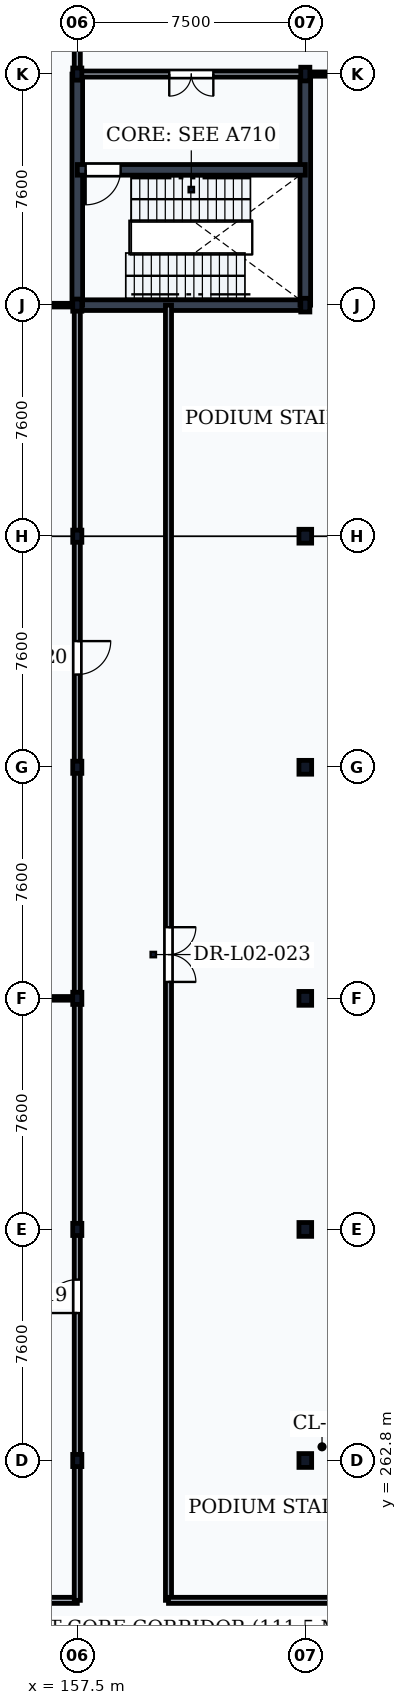
"""IFC4 building model, lengths in metres.
Left out: names, types, materials, properties, quantities, classifications, styles, units other than length and angle.
Written with IfcOpenShell. Run it as: python <this file> out.ifc"""

import sys

from ifc_helpers import new_model, si_unit, direction, frame, frame_2d, origin, origin_2d, place, context, subcontext, project, spatial, rectangle, i_section, extrude, element, fill, save


model = new_model("IFC4")
c1 = context("Model", 3, precision=1e-05, world=origin(), true_north=direction((0.0, 1.0)))
c2 = subcontext(c1, "Body", "Model", "MODEL_VIEW")
j1 = project(units=[si_unit("LENGTHUNIT", "METRE"), si_unit("PLANEANGLEUNIT", "RADIAN")], contexts=[c1])
p1 = place(None, origin())
s1 = spatial("IfcSite", under=j1, at=p1, CompositionType="ELEMENT")
p2 = place(p1, origin())
s2 = spatial("IfcBuilding", under=s1, at=p2, CompositionType="ELEMENT")
p3 = place(p2, frame((0.0, 0.0, 5.4)))
s3 = spatial("IfcBuildingStorey", under=s2, at=p3, CompositionType="ELEMENT", Elevation=5.4)
for number, where, z_axis, x_axis in (
    (1, (157.5, 262.8, 0.0), (0.0, 0.0, 1.0), (1.0, 0.0, 0.0)),
    (2, (157.5, 270.4, 0.0), (0.0, 0.0, 1.0), (1.0, 0.0, 0.0)),
    (3, (157.5, 278.0, 0.0), (0.0, 0.0, 1.0), (1.0, 0.0, 0.0)),
    (4, (157.5, 285.6, 0.0), (0.0, 0.0, 1.0), (1.0, 0.0, 0.0)),
    (5, (157.5, 293.2, 0.0), (0.0, 0.0, 1.0), (1.0, 0.0, 0.0)),
    (6, (157.5, 300.8, 0.0), (0.0, 0.0, 1.0), (1.0, 0.0, 0.0)),
    (7, (157.5, 308.4, 0.0), (0.0, 0.0, 1.0), (1.0, 0.0, 0.0)),
):
    element("IfcColumn", number, at=place(p3, frame(where, z_axis=z_axis, x_axis=x_axis)), inside=s3, PredefinedType="COLUMN", context=c2, shape_type="SweptSolid", body=[
        extrude(i_section(OverallWidth=0.3, OverallDepth=0.4, WebThickness=0.013, FlangeThickness=0.024, FilletRadius=0.027, at=origin_2d()), origin(), (0.0, 0.0, 1.0), 5.1),
    ])
for number, where, z_axis, x_axis in (
    (8, (165.0, 262.8, 0.0), (0.0, 0.0, 1.0), (1.0, 0.0, 0.0)),
    (9, (165.0, 270.4, 0.0), (0.0, 0.0, 1.0), (1.0, 0.0, 0.0)),
    (10, (165.0, 278.0, 0.0), (0.0, 0.0, 1.0), (1.0, 0.0, 0.0)),
    (11, (165.0, 285.6, 0.0), (0.0, 0.0, 1.0), (1.0, 0.0, 0.0)),
    (12, (165.0, 293.2, 0.0), (0.0, 0.0, 1.0), (1.0, 0.0, 0.0)),
):
    element("IfcColumn", number, at=place(p3, frame(where, z_axis=z_axis, x_axis=x_axis)), inside=s3, PredefinedType="COLUMN", context=c2, shape_type="SweptSolid", body=[
        extrude(i_section(OverallWidth=0.418, OverallDepth=0.455, WebThickness=0.042, FlangeThickness=0.068, FilletRadius=0.015, at=origin_2d()), origin(), (0.0, 0.0, 1.0), 5.1),
    ])
for number, where, z_axis, x_axis in (
    (13, (165.0, 300.8, 0.0), (0.0, 0.0, 1.0), (1.0, 0.0, 0.0)),
    (14, (165.0, 308.4, 0.0), (0.0, 0.0, 1.0), (1.0, 0.0, 0.0)),
):
    element("IfcColumn", number, at=place(p3, frame(where, z_axis=z_axis, x_axis=x_axis)), inside=s3, PredefinedType="COLUMN", context=c2, shape_type="SweptSolid", body=[
        extrude(i_section(OverallWidth=0.3, OverallDepth=0.45, WebThickness=0.014, FlangeThickness=0.026, FilletRadius=0.027, at=origin_2d()), origin(), (0.0, 0.0, 1.0), 5.1),
    ])
p4 = place(p3, frame((157.5, 300.8, 0.0), z_axis=(0.0, 0.0, 1.0), x_axis=(1.0, 0.0, 0.0)))
e15 = element("IfcWall", 15, at=p4, inside=s3, PredefinedType="SHEAR", context=c2, shape_type="SweptSolid", body=[
    extrude(rectangle(XDim=7.5, YDim=0.35, at=frame_2d((3.75, 0.0))), origin(), (0.0, 0.0, 1.0), 4.86),
])
for number, where, z_axis, x_axis in (
    (16, (157.5, 300.8, 0.0), (0.0, 0.0, 1.0), (0.0, 1.0, 0.0)),
    (17, (165.0, 300.8, 0.0), (0.0, 0.0, 1.0), (0.0, 1.0, 0.0)),
):
    element("IfcWall", number, at=place(p3, frame(where, z_axis=z_axis, x_axis=x_axis)), inside=s3, PredefinedType="SHEAR", context=c2, shape_type="SweptSolid", body=[
        extrude(rectangle(XDim=7.6, YDim=0.35, at=frame_2d((3.8, 0.0))), origin(), (0.0, 0.0, 1.0), 4.86),
    ])
p5 = place(p3, frame((157.5, 305.25, 0.0), z_axis=(0.0, 0.0, 1.0), x_axis=(1.0, 0.0, 0.0)))
e18 = element("IfcWall", 18, at=p5, inside=s3, PredefinedType="SHEAR", context=c2, shape_type="SweptSolid", body=[
    extrude(rectangle(XDim=7.5, YDim=0.35, at=frame_2d((3.75, 0.0))), origin(), (0.0, 0.0, 1.0), 4.86),
])
p6 = place(p5, frame((0.275, 0.0, 0.0)))
e19 = element("IfcOpeningElement", 19, at=p6, cuts=e18, PredefinedType="OPENING", context=c2, shape_type="SweptSolid", body=[
    extrude(rectangle(XDim=1.15, YDim=2.15, at=frame_2d((0.575, 1.075))), frame((0.0, 0.19, 0.0), z_axis=(0.0, -1.0, 0.0), x_axis=(1.0, 0.0, 0.0)), (0.0, 0.0, 1.0), 0.38),
])
p7 = place(p3, frame((157.5, 308.4, 0.0), z_axis=(0.0, 0.0, 1.0), x_axis=(1.0, 0.0, 0.0)))
e20 = element("IfcWall", 20, at=p7, inside=s3, PredefinedType="PARTITIONING", context=c2, shape_type="SweptSolid", body=[
    extrude(rectangle(XDim=7.5, YDim=0.2, at=frame_2d((3.75, 0.0))), origin(), (0.0, 0.0, 1.0), 4.498),
])
p8 = place(p7, frame((3.025, 0.0, 0.0)))
e21 = element("IfcOpeningElement", 21, at=p8, cuts=e20, PredefinedType="OPENING", context=c2, shape_type="SweptSolid", body=[
    extrude(rectangle(XDim=1.45, YDim=2.2, at=frame_2d((0.725, 1.1))), frame((0.0, 0.115, 0.0), z_axis=(0.0, -1.0, 0.0), x_axis=(1.0, 0.0, 0.0)), (0.0, 0.0, 1.0), 0.23),
])
p9 = place(p3, frame((135.0, 258.2, 0.0), z_axis=(0.0, 0.0, 1.0), x_axis=(1.0, 0.0, 0.0)))
e22 = element("IfcWall", 22, at=p9, inside=s3, PredefinedType="PARTITIONING", context=c2, shape_type="SweptSolid", body=[
    extrude(rectangle(XDim=22.5, YDim=0.2, at=frame_2d((11.25, 0.0))), origin(), (0.0, 0.0, 1.0), 4.85),
])
p10 = place(p9, frame((10.25, 0.0, 0.0)))
e23 = element("IfcOpeningElement", 23, at=p10, cuts=e22, PredefinedType="OPENING", context=c2, shape_type="SweptSolid", body=[
    extrude(rectangle(XDim=1.5, YDim=2.25, at=frame_2d((0.75, 1.125))), frame((0.0, 0.115, 0.0), z_axis=(0.0, -1.0, 0.0), x_axis=(1.0, 0.0, 0.0)), (0.0, 0.0, 1.0), 0.23),
])
p11 = place(p3, frame((157.5, 258.2, 0.0), z_axis=(0.0, 0.0, 1.0), x_axis=(0.0, 1.0, 0.0)))
e24 = element("IfcWall", 24, at=p11, inside=s3, PredefinedType="PARTITIONING", context=c2, shape_type="SweptSolid", body=[
    extrude(rectangle(XDim=42.6, YDim=0.2, at=frame_2d((21.3, 0.0))), origin(), (0.0, 0.0, 1.0), 4.498),
])
p12 = place(p11, frame((9.45, 0.0, 0.0)))
e25 = element("IfcOpeningElement", 25, at=p12, cuts=e24, PredefinedType="OPENING", context=c2, shape_type="SweptSolid", body=[
    extrude(rectangle(XDim=1.1, YDim=2.1, at=frame_2d((0.55, 1.05))), frame((0.0, 0.115, 0.0), z_axis=(0.0, -1.0, 0.0), x_axis=(1.0, 0.0, 0.0)), (0.0, 0.0, 1.0), 0.23),
])
p13 = place(p11, frame((30.45, 0.0, 0.0)))
e26 = element("IfcOpeningElement", 26, at=p13, cuts=e24, PredefinedType="OPENING", context=c2, shape_type="SweptSolid", body=[
    extrude(rectangle(XDim=1.1, YDim=2.1, at=frame_2d((0.55, 1.05))), frame((0.0, 0.115, 0.0), z_axis=(0.0, -1.0, 0.0), x_axis=(1.0, 0.0, 0.0)), (0.0, 0.0, 1.0), 0.23),
])
p14 = place(p3, frame((157.5, 308.4, 0.0), z_axis=(0.0, 0.0, 1.0), x_axis=(0.0, 1.0, 0.0)))
e27 = element("IfcWall", 27, at=p14, inside=s3, PredefinedType="PARTITIONING", context=c2, shape_type="SweptSolid", body=[
    extrude(rectangle(XDim=29.6, YDim=0.2, at=frame_2d((14.8, 0.0))), origin(), (0.0, 0.0, 1.0), 4.498),
])
p15 = place(p14, frame((3.45, 0.0, 0.0)))
e28 = element("IfcOpeningElement", 28, at=p15, cuts=e27, PredefinedType="OPENING", context=c2, shape_type="SweptSolid", body=[
    extrude(rectangle(XDim=1.1, YDim=2.1, at=frame_2d((0.55, 1.05))), frame((0.0, 0.115, 0.0), z_axis=(0.0, -1.0, 0.0), x_axis=(1.0, 0.0, 0.0)), (0.0, 0.0, 1.0), 0.23),
])
p16 = place(p14, frame((17.25, 0.0, 0.0)))
e29 = element("IfcOpeningElement", 29, at=p16, cuts=e27, PredefinedType="OPENING", context=c2, shape_type="SweptSolid", body=[
    extrude(rectangle(XDim=1.5, YDim=2.25, at=frame_2d((0.75, 1.125))), frame((0.0, 0.115, 0.0), z_axis=(0.0, -1.0, 0.0), x_axis=(1.0, 0.0, 0.0)), (0.0, 0.0, 1.0), 0.23),
])
p17 = place(p3, frame((160.5, 258.2, 0.0), z_axis=(0.0, 0.0, 1.0), x_axis=(0.0, 1.0, 0.0)))
e30 = element("IfcWall", 30, at=p17, inside=s3, PredefinedType="PARTITIONING", context=c2, shape_type="SweptSolid", body=[
    extrude(rectangle(XDim=42.6, YDim=0.2, at=frame_2d((21.3, 0.0))), origin(), (0.0, 0.0, 1.0), 4.86),
])
p18 = place(p17, frame((20.34, 0.0, 0.0)))
e31 = element("IfcOpeningElement", 31, at=p18, cuts=e30, PredefinedType="OPENING", context=c2, shape_type="SweptSolid", body=[
    extrude(rectangle(XDim=1.8, YDim=2.4, at=frame_2d((0.9, 1.2))), frame((0.0, 0.115, 0.0), z_axis=(0.0, -1.0, 0.0), x_axis=(1.0, 0.0, 0.0)), (0.0, 0.0, 1.0), 0.23),
])
p19 = place(p3, frame((135.0, 278.0, 0.0), z_axis=(0.0, 0.0, 1.0), x_axis=(1.0, 0.0, 0.0)))
e32 = element("IfcWall", 32, at=p19, inside=s3, PredefinedType="PARTITIONING", context=c2, shape_type="SweptSolid", body=[
    extrude(rectangle(XDim=22.5, YDim=0.12, at=frame_2d((11.25, 0.0))), origin(), (0.0, 0.0, 1.0), 4.488),
])
p20 = place(p19, frame((8.3, 0.0, 0.0)))
e33 = element("IfcOpeningElement", 33, at=p20, cuts=e32, PredefinedType="OPENING", context=c2, shape_type="SweptSolid", body=[
    extrude(rectangle(XDim=1.0, YDim=2.1, at=frame_2d((0.5, 1.05))), frame((0.0, 0.075, 0.0), z_axis=(0.0, -1.0, 0.0), x_axis=(1.0, 0.0, 0.0)), (0.0, 0.0, 1.0), 0.15),
])
p21 = place(p3, frame((135.0, 300.8, 0.0), z_axis=(0.0, 0.0, 1.0), x_axis=(1.0, 0.0, 0.0)))
e34 = element("IfcWall", 34, at=p21, inside=s3, PredefinedType="PARTITIONING", context=c2, shape_type="SweptSolid", body=[
    extrude(rectangle(XDim=22.5, YDim=0.12, at=frame_2d((11.25, 0.0))), origin(), (0.0, 0.0, 1.0), 4.488),
])
p22 = place(p21, frame((8.3, 0.0, 0.0)))
e35 = element("IfcOpeningElement", 35, at=p22, cuts=e34, PredefinedType="OPENING", context=c2, shape_type="SweptSolid", body=[
    extrude(rectangle(XDim=1.0, YDim=2.1, at=frame_2d((0.5, 1.05))), frame((0.0, 0.075, 0.0), z_axis=(0.0, -1.0, 0.0), x_axis=(1.0, 0.0, 0.0)), (0.0, 0.0, 1.0), 0.15),
])
p23 = place(p3, frame((160.5, 258.2, 0.0), z_axis=(0.0, 0.0, 1.0), x_axis=(1.0, 0.0, 0.0)))
e36 = element("IfcWall", 36, at=p23, inside=s3, PredefinedType="PARTITIONING", context=c2, shape_type="SweptSolid", body=[
    extrude(rectangle(XDim=94.5, YDim=0.2, at=frame_2d((47.25, 0.0))), origin(), (0.0, 0.0, 1.0), 4.86),
])
p24 = place(p23, frame((24.1, 0.0, 0.0)))
e37 = element("IfcOpeningElement", 37, at=p24, cuts=e36, PredefinedType="OPENING", context=c2, shape_type="SweptSolid", body=[
    extrude(rectangle(XDim=1.8, YDim=2.4, at=frame_2d((0.9, 1.2))), frame((0.0, 0.115, 0.0), z_axis=(0.0, -1.0, 0.0), x_axis=(1.0, 0.0, 0.0)), (0.0, 0.0, 1.0), 0.23),
])
p25 = place(p23, frame((77.1, 0.0, 0.0)))
e38 = element("IfcOpeningElement", 38, at=p25, cuts=e36, PredefinedType="OPENING", context=c2, shape_type="SweptSolid", body=[
    extrude(rectangle(XDim=1.8, YDim=2.4, at=frame_2d((0.9, 1.2))), frame((0.0, 0.115, 0.0), z_axis=(0.0, -1.0, 0.0), x_axis=(1.0, 0.0, 0.0)), (0.0, 0.0, 1.0), 0.23),
])
p26 = place(p3, frame((165.0, 308.4, 0.0), z_axis=(0.0, 0.0, 1.0), x_axis=(1.0, 0.0, 0.0)))
e39 = element("IfcWall", 39, at=p26, inside=s3, PredefinedType="PARTITIONING", context=c2, shape_type="SweptSolid", body=[
    extrude(rectangle(XDim=32.0, YDim=0.14, at=frame_2d((16.0, 0.0))), origin(), (0.0, 0.0, 1.0), 4.408),
])
p27 = place(p26, frame((16.6, 0.0, 0.0)))
e40 = element("IfcOpeningElement", 40, at=p27, cuts=e39, PredefinedType="OPENING", context=c2, shape_type="SweptSolid", body=[
    extrude(rectangle(XDim=1.8, YDim=2.4, at=frame_2d((0.9, 1.2))), frame((0.0, 0.085, 0.0), z_axis=(0.0, -1.0, 0.0), x_axis=(1.0, 0.0, 0.0)), (0.0, 0.0, 1.0), 0.17),
])
p28 = place(p6, frame((1.15, 0.0, 0.0), z_axis=(0.0, 0.0, 1.0), x_axis=(-1.0, 0.0, 0.0)))
e41 = element("IfcDoor", 41, at=p28, inside=s3, OperationType="SINGLE_SWING_RIGHT", PredefinedType="DOOR", context=c2, shape_type="SweptSolid", body=[
    extrude(rectangle(XDim=1.15, YDim=2.15, at=frame_2d((0.575, 1.075))), frame((0.0, 0.025, 0.0), z_axis=(0.0, -1.0, 0.0), x_axis=(1.0, 0.0, 0.0)), (0.0, 0.0, 1.0), 0.05),
])
fill(e19, e41)
p29 = place(p8, frame((1.45, 0.0, 0.0), z_axis=(0.0, 0.0, 1.0), x_axis=(-1.0, 0.0, 0.0)))
e42 = element("IfcDoor", 42, at=p29, inside=s3, OperationType="DOUBLE_DOOR_SINGLE_SWING", PredefinedType="DOOR", context=c2, shape_type="SweptSolid", body=[
    extrude(rectangle(XDim=1.45, YDim=2.2, at=frame_2d((0.725, 1.1))), frame((0.0, 0.025, 0.0), z_axis=(0.0, -1.0, 0.0), x_axis=(1.0, 0.0, 0.0)), (0.0, 0.0, 1.0), 0.05),
])
fill(e21, e42)
p30 = place(p12, origin())
e43 = element("IfcDoor", 43, at=p30, inside=s3, OperationType="SINGLE_SWING_LEFT", PredefinedType="DOOR", context=c2, shape_type="SweptSolid", body=[
    extrude(rectangle(XDim=1.1, YDim=2.1, at=frame_2d((0.55, 1.05))), frame((0.0, 0.025, 0.0), z_axis=(0.0, -1.0, 0.0), x_axis=(1.0, 0.0, 0.0)), (0.0, 0.0, 1.0), 0.05),
])
fill(e25, e43)
p31 = place(p13, origin())
e44 = element("IfcDoor", 44, at=p31, inside=s3, OperationType="SINGLE_SWING_RIGHT", PredefinedType="DOOR", context=c2, shape_type="SweptSolid", body=[
    extrude(rectangle(XDim=1.1, YDim=2.1, at=frame_2d((0.55, 1.05))), frame((0.0, 0.025, 0.0), z_axis=(0.0, -1.0, 0.0), x_axis=(1.0, 0.0, 0.0)), (0.0, 0.0, 1.0), 0.05),
])
fill(e26, e44)
p32 = place(p18, frame((1.8, 0.0, 0.0), z_axis=(0.0, 0.0, 1.0), x_axis=(-1.0, 0.0, 0.0)))
e45 = element("IfcDoor", 45, at=p32, inside=s3, OperationType="DOUBLE_DOOR_SINGLE_SWING", PredefinedType="DOOR", context=c2, shape_type="SweptSolid", body=[
    extrude(rectangle(XDim=1.8, YDim=2.4, at=frame_2d((0.9, 1.2))), frame((0.0, 0.025, 0.0), z_axis=(0.0, -1.0, 0.0), x_axis=(1.0, 0.0, 0.0)), (0.0, 0.0, 1.0), 0.05),
])
fill(e31, e45)
save(model, sys.argv[1])
